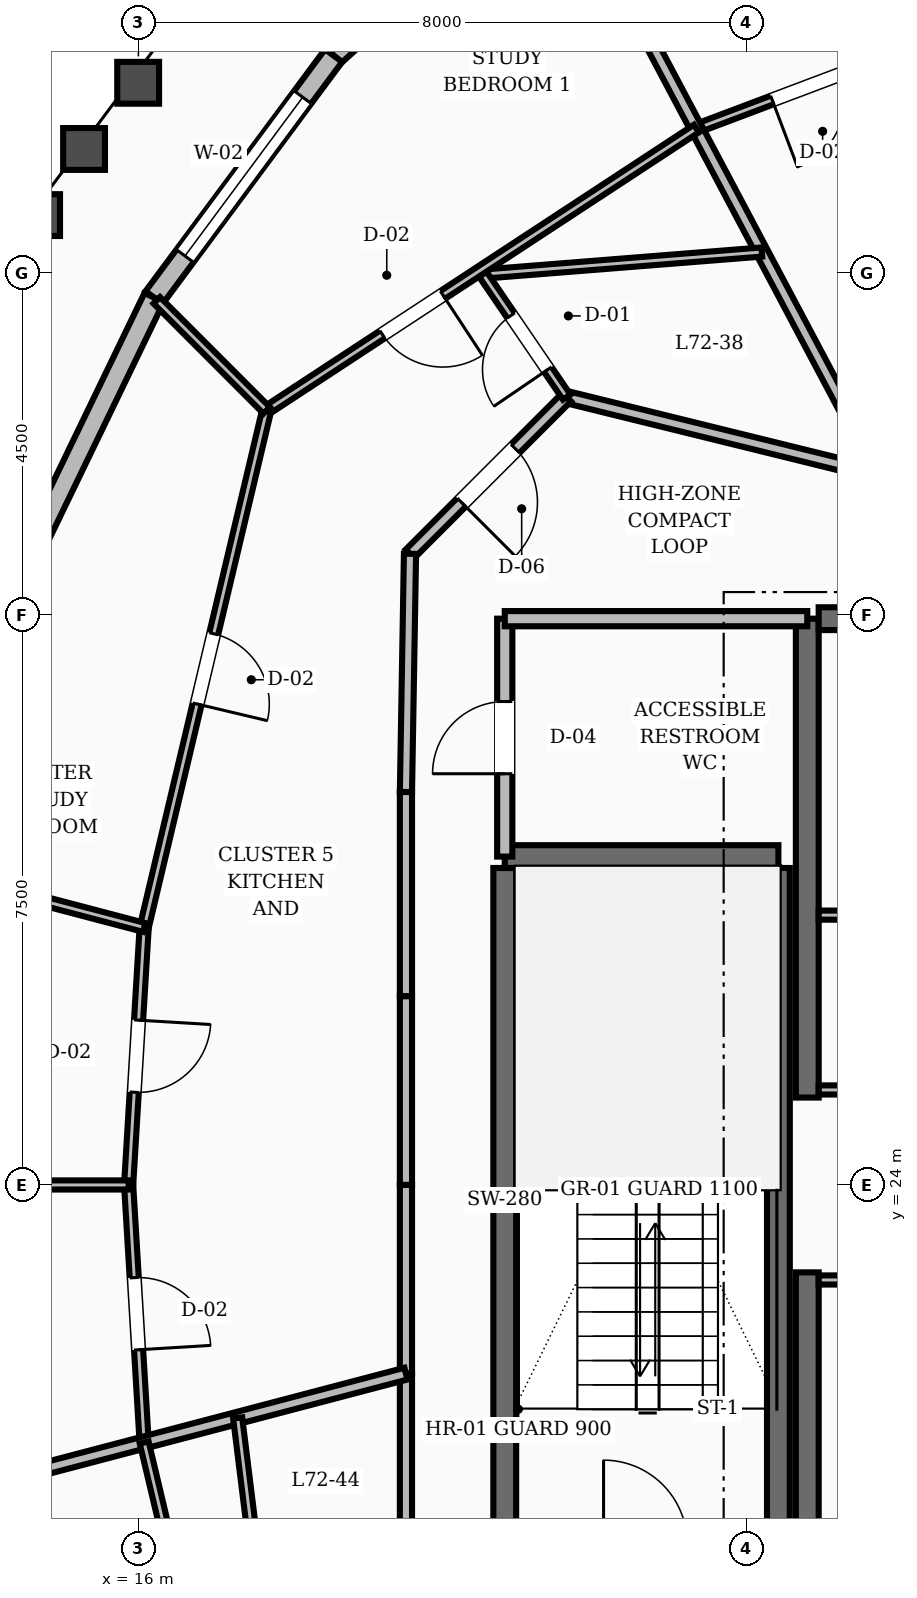
"""IFC4 building model, lengths in metres.
Left out: names, types, materials, properties, quantities, classifications, styles, units other than length and angle.
Written with IfcOpenShell. Run it as: python <this file> out.ifc"""

import sys

from ifc_helpers import new_model, si_unit, direction, frame, frame_2d, origin, place, context, subcontext, project, spatial, rectangle, extrude, element, fill, save


model = new_model("IFC4")
c1 = context("Model", 3, precision=1e-05, world=origin(), true_north=direction((0.0, 1.0)))
c2 = subcontext(c1, "Body", "Model", "MODEL_VIEW")
j1 = project(units=[si_unit("LENGTHUNIT", "METRE"), si_unit("PLANEANGLEUNIT", "RADIAN")], contexts=[c1])
p1 = place(None, origin())
s1 = spatial("IfcSite", under=j1, at=p1, CompositionType="ELEMENT")
p2 = place(p1, origin())
s2 = spatial("IfcBuilding", under=s1, at=p2, CompositionType="ELEMENT")
p3 = place(p2, frame((0.0, 0.0, 276.0)))
s3 = spatial("IfcBuildingStorey", under=s2, at=p3, CompositionType="ELEMENT", Elevation=276.0)
for number, where, z_axis, x_axis in (
    (1, (24.8, 16.55, 0.0), (0.0, 0.0, 1.0), (0.0, 1.0, 0.0)),
    (2, (24.8, 25.15, 0.0), (0.0, 0.0, 1.0), (0.0, 1.0, 0.0)),
):
    element("IfcWall", number, at=place(p3, frame(where, z_axis=z_axis, x_axis=x_axis)), inside=s3, PredefinedType="SHEAR", context=c2, shape_type="SweptSolid", body=[
        extrude(rectangle(XDim=6.3, YDim=0.3, at=frame_2d((3.15, 0.0))), origin(), (0.0, 0.0, 1.0), 3.6),
    ])
p4 = place(p3, frame((24.95, 31.45, 0.0), z_axis=(0.0, 0.0, 1.0), x_axis=(1.0, 0.0, 0.0)))
e3 = element("IfcWall", 3, at=p4, inside=s3, PredefinedType="SHEAR", context=c2, shape_type="SweptSolid", body=[
    extrude(rectangle(XDim=3.25, YDim=0.3, at=frame_2d((1.625, 0.0))), origin(), (0.0, 0.0, 1.0), 3.6),
])
for number, where, z_axis, x_axis in (
    (4, (20.82, 19.43, 0.0), (0.0, 0.0, 1.0), (0.0, 1.0, 0.0)),
    (5, (24.42, 19.43, 0.0), (0.0, 0.0, 1.0), (0.0, 1.0, 0.0)),
):
    element("IfcWall", number, at=place(p3, frame(where, z_axis=z_axis, x_axis=x_axis)), inside=s3, PredefinedType="SHEAR", context=c2, shape_type="SweptSolid", body=[
        extrude(rectangle(XDim=8.74, YDim=0.3, at=frame_2d((4.37, 0.0))), origin(), (0.0, 0.0, 1.0), 3.6),
    ])
p5 = place(p3, frame((20.82, 28.32, 0.0), z_axis=(0.0, 0.0, 1.0), x_axis=(1.0, 0.0, 0.0)))
e6 = element("IfcWall", 6, at=p5, inside=s3, PredefinedType="SHEAR", context=c2, shape_type="SweptSolid", body=[
    extrude(rectangle(XDim=3.6, YDim=0.3, at=frame_2d((1.8, 0.0))), origin(), (0.0, 0.0, 1.0), 3.6),
])
p6 = place(p3, frame((21.447, 41.471, 0.0), z_axis=(0.0, 0.0, 1.0), x_axis=(-0.740383189604, -0.672185043386, 0.0)))
e7 = element("IfcWall", 7, at=p6, inside=s3, PredefinedType="STANDARD", context=c2, shape_type="SweptSolid", body=[
    extrude(rectangle(XDim=3.888, YDim=0.28, at=frame_2d((1.944, 0.0))), origin(), (0.0, 0.0, 1.0), 2.88),
])
p7 = place(p3, frame((18.569, 38.858, 0.0), z_axis=(0.0, 0.0, 1.0), x_axis=(-0.595834112452, -0.803107533546, 0.0)))
e8 = element("IfcWall", 8, at=p7, inside=s3, PredefinedType="STANDARD", context=c2, shape_type="SweptSolid", body=[
    extrude(rectangle(XDim=3.965, YDim=0.28, at=frame_2d((1.982, 0.0))), origin(), (0.0, 0.0, 1.0), 2.88),
])
p8 = place(p7, frame((0.682, 0.0, 0.8)))
e9 = element("IfcOpeningElement", 9, at=p8, cuts=e8, PredefinedType="OPENING", context=c2, shape_type="SweptSolid", body=[
    extrude(rectangle(XDim=2.6, YDim=1.65, at=frame_2d((1.3, 0.825))), frame((0.0, 0.15, 0.0), z_axis=(0.0, -1.0, 0.0), x_axis=(1.0, 0.0, 0.0)), (0.0, 0.0, 1.0), 0.3),
])
p9 = place(p3, frame((16.206, 35.674, 0.0), z_axis=(0.0, 0.0, 1.0), x_axis=(-0.435070554904, -0.900396363973, 0.0)))
e10 = element("IfcWall", 10, at=p9, inside=s3, PredefinedType="STANDARD", context=c2, shape_type="SweptSolid", body=[
    extrude(rectangle(XDim=4.035, YDim=0.28, at=frame_2d((2.017, 0.0))), origin(), (0.0, 0.0, 1.0), 2.88),
])
p10 = place(p3, frame((20.82, 28.32, 0.0), z_axis=(0.0, 0.0, 1.0), x_axis=(0.0, 1.0, 0.0)))
e11 = element("IfcWall", 11, at=p10, inside=s3, PredefinedType="SOLIDWALL", context=c2, shape_type="SweptSolid", body=[
    extrude(rectangle(XDim=3.13, YDim=0.2, at=frame_2d((1.565, 0.0))), origin(), (0.0, 0.0, 1.0), 2.87),
])
p11 = place(p10, frame((1.09, 0.0, 0.0)))
e12 = element("IfcOpeningElement", 12, at=p11, cuts=e11, PredefinedType="OPENING", context=c2, shape_type="SweptSolid", body=[
    extrude(rectangle(XDim=0.95, YDim=2.1, at=frame_2d((0.475, 1.05))), frame((0.0, 0.11, 0.0), z_axis=(0.0, -1.0, 0.0), x_axis=(1.0, 0.0, 0.0)), (0.0, 0.0, 1.0), 0.22),
])
p12 = place(p3, frame((20.82, 31.45, 0.0), z_axis=(0.0, 0.0, 1.0), x_axis=(1.0, 0.0, 0.0)))
e13 = element("IfcWall", 13, at=p12, inside=s3, PredefinedType="SOLIDWALL", context=c2, shape_type="SweptSolid", body=[
    extrude(rectangle(XDim=3.98, YDim=0.2, at=frame_2d((1.99, 0.0))), origin(), (0.0, 0.0, 1.0), 2.87),
])
p13 = place(p3, frame((24.95, 25.25, 0.0), z_axis=(0.0, 0.0, 1.0), x_axis=(1.0, 0.0, 0.0)))
e14 = element("IfcWall", 14, at=p13, inside=s3, PredefinedType="PARTITIONING", context=c2, shape_type="SweptSolid", body=[
    extrude(rectangle(XDim=3.2, YDim=0.12, at=frame_2d((1.6, 0.0))), origin(), (0.0, 0.0, 1.0), 2.87),
])
p14 = place(p13, frame((1.125, 0.0, 0.0)))
e15 = element("IfcOpeningElement", 15, at=p14, cuts=e14, PredefinedType="OPENING", context=c2, shape_type="SweptSolid", body=[
    extrude(rectangle(XDim=0.95, YDim=2.1, at=frame_2d((0.475, 1.05))), frame((0.0, 0.07, 0.0), z_axis=(0.0, -1.0, 0.0), x_axis=(1.0, 0.0, 0.0)), (0.0, 0.0, 1.0), 0.14),
])
p15 = place(p3, frame((24.95, 22.75, 0.0), z_axis=(0.0, 0.0, 1.0), x_axis=(1.0, 0.0, 0.0)))
e16 = element("IfcWall", 16, at=p15, inside=s3, PredefinedType="PARTITIONING", context=c2, shape_type="SweptSolid", body=[
    extrude(rectangle(XDim=3.2, YDim=0.12, at=frame_2d((1.6, 0.0))), origin(), (0.0, 0.0, 1.0), 2.87),
])
p16 = place(p15, frame((1.125, 0.0, 0.0)))
e17 = element("IfcOpeningElement", 17, at=p16, cuts=e16, PredefinedType="OPENING", context=c2, shape_type="SweptSolid", body=[
    extrude(rectangle(XDim=0.95, YDim=2.1, at=frame_2d((0.475, 1.05))), frame((0.0, 0.07, 0.0), z_axis=(0.0, -1.0, 0.0), x_axis=(1.0, 0.0, 0.0)), (0.0, 0.0, 1.0), 0.14),
])
p17 = place(p3, frame((24.95, 27.55, 0.0), z_axis=(0.0, 0.0, 1.0), x_axis=(1.0, 0.0, 0.0)))
e18 = element("IfcWall", 18, at=p17, inside=s3, PredefinedType="PARTITIONING", context=c2, shape_type="SweptSolid", body=[
    extrude(rectangle(XDim=3.2, YDim=0.12, at=frame_2d((1.6, 0.0))), origin(), (0.0, 0.0, 1.0), 2.87),
])
p18 = place(p17, frame((1.125, 0.0, 0.0)))
e19 = element("IfcOpeningElement", 19, at=p18, cuts=e18, PredefinedType="OPENING", context=c2, shape_type="SweptSolid", body=[
    extrude(rectangle(XDim=0.95, YDim=2.1, at=frame_2d((0.475, 1.05))), frame((0.0, 0.07, 0.0), z_axis=(0.0, -1.0, 0.0), x_axis=(1.0, 0.0, 0.0)), (0.0, 0.0, 1.0), 0.14),
])
p19 = place(p3, frame((25.752, 33.35, 0.0), z_axis=(0.0, 0.0, 1.0), x_axis=(-0.970939799552, 0.239323850978, 0.0)))
e20 = element("IfcWall", 20, at=p19, inside=s3, PredefinedType="SOLIDWALL", context=c2, shape_type="SweptSolid", body=[
    extrude(rectangle(XDim=4.241, YDim=0.16, at=frame_2d((2.12, 0.0))), origin(), (0.0, 0.0, 1.0), 2.87),
])
p20 = place(p3, frame((21.635, 34.365, 0.0), z_axis=(0.0, 0.0, 1.0), x_axis=(-0.707106781187, -0.707106781187, 0.0)))
e21 = element("IfcWall", 21, at=p20, inside=s3, PredefinedType="SOLIDWALL", context=c2, shape_type="SweptSolid", body=[
    extrude(rectangle(XDim=2.916, YDim=0.16, at=frame_2d((1.458, 0.0))), origin(), (0.0, 0.0, 1.0), 2.87),
])
p21 = place(p20, frame((0.958, 0.0, 0.0)))
e22 = element("IfcOpeningElement", 22, at=p21, cuts=e21, PredefinedType="OPENING", context=c2, shape_type="SweptSolid", body=[
    extrude(rectangle(XDim=1.0, YDim=2.1, at=frame_2d((0.5, 1.05))), frame((0.0, 0.09, 0.0), z_axis=(0.0, -1.0, 0.0), x_axis=(1.0, 0.0, 0.0)), (0.0, 0.0, 1.0), 0.18),
])
p22 = place(p3, frame((19.573, 32.303, 0.0), z_axis=(0.0, 0.0, 1.0), x_axis=(-0.016981035134, -0.999855811828, 0.0)))
e23 = element("IfcWall", 23, at=p22, inside=s3, PredefinedType="SOLIDWALL", context=c2, shape_type="SweptSolid", body=[
    extrude(rectangle(XDim=3.134, YDim=0.16, at=frame_2d((1.567, 0.0))), origin(), (0.0, 0.0, 1.0), 2.87),
])
p23 = place(p3, frame((19.52, 29.169, 0.0), z_axis=(0.0, 0.0, 1.0), x_axis=(0.0, -1.0, 0.0)))
e24 = element("IfcWall", 24, at=p23, inside=s3, PredefinedType="SOLIDWALL", context=c2, shape_type="SweptSolid", body=[
    extrude(rectangle(XDim=2.687, YDim=0.16, at=frame_2d((1.344, 0.0))), origin(), (0.0, 0.0, 1.0), 2.87),
])
for number, where, z_axis, x_axis in (
    (25, (19.52, 26.482, 0.0), (0.0, 0.0, 1.0), (0.0, -1.0, 0.0)),
    (26, (19.52, 24.0, 0.0), (0.0, 0.0, 1.0), (0.0, -1.0, 0.0)),
):
    element("IfcWall", number, at=place(p3, frame(where, z_axis=z_axis, x_axis=x_axis)), inside=s3, PredefinedType="SOLIDWALL", context=c2, shape_type="SweptSolid", body=[
        extrude(rectangle(XDim=2.482, YDim=0.16, at=frame_2d((1.241, 0.0))), origin(), (0.0, 0.0, 1.0), 2.87),
    ])
p24 = place(p3, frame((19.52, 21.518, 0.0), z_axis=(0.0, 0.0, 1.0), x_axis=(0.0, -1.0, 0.0)))
e27 = element("IfcWall", 27, at=p24, inside=s3, PredefinedType="SOLIDWALL", context=c2, shape_type="SweptSolid", body=[
    extrude(rectangle(XDim=2.687, YDim=0.16, at=frame_2d((1.344, 0.0))), origin(), (0.0, 0.0, 1.0), 2.87),
])
p25 = place(p3, frame((26.225, 38.985, 0.0), z_axis=(0.0, 0.0, 1.0), x_axis=(-0.935699429687, -0.352798210431, 0.0)))
e28 = element("IfcWall", 28, at=p25, inside=s3, PredefinedType="PARTITIONING", context=c2, shape_type="SweptSolid", body=[
    extrude(rectangle(XDim=3.082, YDim=0.12, at=frame_2d((1.541, 0.0))), origin(), (0.0, 0.0, 1.0), 2.87),
])
p26 = place(p25, frame((1.066, 0.0, 0.0)))
e29 = element("IfcOpeningElement", 29, at=p26, cuts=e28, PredefinedType="OPENING", context=c2, shape_type="SweptSolid", body=[
    extrude(rectangle(XDim=0.95, YDim=2.1, at=frame_2d((0.475, 1.05))), frame((0.0, 0.07, 0.0), z_axis=(0.0, -1.0, 0.0), x_axis=(1.0, 0.0, 0.0)), (0.0, 0.0, 1.0), 0.14),
])
p27 = place(p3, frame((25.752, 33.35, 0.0), z_axis=(0.0, 0.0, 1.0), x_axis=(-0.468387037798, 0.883523391214, 0.0)))
e30 = element("IfcWall", 30, at=p27, inside=s3, PredefinedType="SOLIDWALL", context=c2, shape_type="SweptSolid", body=[
    extrude(rectangle(XDim=9.142, YDim=0.16, at=frame_2d((4.571, 0.0))), origin(), (0.0, 0.0, 1.0), 2.87),
])
p28 = place(p3, frame((24.202, 36.274, 0.0), z_axis=(0.0, 0.0, 1.0), x_axis=(-0.996873188539, -0.079018010423, 0.0)))
e31 = element("IfcWall", 31, at=p28, inside=s3, PredefinedType="PARTITIONING", context=c2, shape_type="SweptSolid", body=[
    extrude(rectangle(XDim=3.683, YDim=0.12, at=frame_2d((1.841, 0.0))), origin(), (0.0, 0.0, 1.0), 2.87),
])
p29 = place(p3, frame((21.635, 34.365, 0.0), z_axis=(0.0, 0.0, 1.0), x_axis=(-0.563700368574, 0.825979354748, 0.0)))
e32 = element("IfcWall", 32, at=p29, inside=s3, PredefinedType="PARTITIONING", context=c2, shape_type="SweptSolid", body=[
    extrude(rectangle(XDim=1.958, YDim=0.12, at=frame_2d((0.979, 0.0))), origin(), (0.0, 0.0, 1.0), 2.87),
])
p30 = place(p29, frame((0.44, 0.0, 0.0)))
e33 = element("IfcOpeningElement", 33, at=p30, cuts=e32, PredefinedType="OPENING", context=c2, shape_type="SweptSolid", body=[
    extrude(rectangle(XDim=0.86, YDim=2.1, at=frame_2d((0.43, 1.05))), frame((0.0, 0.07, 0.0), z_axis=(0.0, -1.0, 0.0), x_axis=(1.0, 0.0, 0.0)), (0.0, 0.0, 1.0), 0.14),
])
p31 = place(p3, frame((23.341, 37.898, 0.0), z_axis=(0.0, 0.0, 1.0), x_axis=(-0.836259569514, -0.548333778274, 0.0)))
e34 = element("IfcWall", 34, at=p31, inside=s3, PredefinedType="PARTITIONING", context=c2, shape_type="SweptSolid", body=[
    extrude(rectangle(XDim=6.76, YDim=0.12, at=frame_2d((3.38, 0.0))), origin(), (0.0, 0.0, 1.0), 2.87),
])
p32 = place(p31, frame((3.99, 0.0, 0.0)))
e35 = element("IfcOpeningElement", 35, at=p32, cuts=e34, PredefinedType="OPENING", context=c2, shape_type="SweptSolid", body=[
    extrude(rectangle(XDim=0.95, YDim=2.1, at=frame_2d((0.475, 1.05))), frame((0.0, 0.07, 0.0), z_axis=(0.0, -1.0, 0.0), x_axis=(1.0, 0.0, 0.0)), (0.0, 0.0, 1.0), 0.14),
])
p33 = place(p3, frame((17.688, 34.191, 0.0), z_axis=(0.0, 0.0, 1.0), x_axis=(-0.230512502036, -0.973069363615, 0.0)))
e36 = element("IfcWall", 36, at=p33, inside=s3, PredefinedType="PARTITIONING", context=c2, shape_type="SweptSolid", body=[
    extrude(rectangle(XDim=6.991, YDim=0.12, at=frame_2d((3.496, 0.0))), origin(), (0.0, 0.0, 1.0), 2.87),
])
p34 = place(p33, frame((3.021, 0.0, 0.0)))
e37 = element("IfcOpeningElement", 37, at=p34, cuts=e36, PredefinedType="OPENING", context=c2, shape_type="SweptSolid", body=[
    extrude(rectangle(XDim=0.95, YDim=2.1, at=frame_2d((0.475, 1.05))), frame((0.0, 0.07, 0.0), z_axis=(0.0, -1.0, 0.0), x_axis=(1.0, 0.0, 0.0)), (0.0, 0.0, 1.0), 0.14),
])
p35 = place(p3, frame((17.688, 34.191, 0.0), z_axis=(0.0, 0.0, 1.0), x_axis=(-0.706689063462, 0.707524252293, 0.0)))
e38 = element("IfcWall", 38, at=p35, inside=s3, PredefinedType="PARTITIONING", context=c2, shape_type="SweptSolid", body=[
    extrude(rectangle(XDim=2.046, YDim=0.12, at=frame_2d((1.023, 0.0))), origin(), (0.0, 0.0, 1.0), 2.87),
])
p36 = place(p3, frame((16.076, 27.388, 0.0), z_axis=(0.0, 0.0, 1.0), x_axis=(-0.060277885003, -0.998181635064, 0.0)))
e39 = element("IfcWall", 39, at=p36, inside=s3, PredefinedType="PARTITIONING", context=c2, shape_type="SweptSolid", body=[
    extrude(rectangle(XDim=3.394, YDim=0.12, at=frame_2d((1.697, 0.0))), origin(), (0.0, 0.0, 1.0), 2.87),
])
p37 = place(p36, frame((1.222, 0.0, 0.0)))
e40 = element("IfcOpeningElement", 40, at=p37, cuts=e39, PredefinedType="OPENING", context=c2, shape_type="SweptSolid", body=[
    extrude(rectangle(XDim=0.95, YDim=2.1, at=frame_2d((0.475, 1.05))), frame((0.0, 0.07, 0.0), z_axis=(0.0, -1.0, 0.0), x_axis=(1.0, 0.0, 0.0)), (0.0, 0.0, 1.0), 0.14),
])
p38 = place(p3, frame((16.076, 27.388, 0.0), z_axis=(0.0, 0.0, 1.0), x_axis=(-0.96713435231, 0.25426589347, 0.0)))
e41 = element("IfcWall", 41, at=p38, inside=s3, PredefinedType="PARTITIONING", context=c2, shape_type="SweptSolid", body=[
    extrude(rectangle(XDim=2.748, YDim=0.12, at=frame_2d((1.374, 0.0))), origin(), (0.0, 0.0, 1.0), 2.87),
])
p39 = place(p3, frame((15.872, 24.0, 0.0), z_axis=(0.0, 0.0, 1.0), x_axis=(0.060277885003, -0.998181635064, 0.0)))
e42 = element("IfcWall", 42, at=p39, inside=s3, PredefinedType="PARTITIONING", context=c2, shape_type="SweptSolid", body=[
    extrude(rectangle(XDim=3.394, YDim=0.12, at=frame_2d((1.697, 0.0))), origin(), (0.0, 0.0, 1.0), 2.87),
])
p40 = place(p39, frame((1.222, 0.0, 0.0)))
e43 = element("IfcOpeningElement", 43, at=p40, cuts=e42, PredefinedType="OPENING", context=c2, shape_type="SweptSolid", body=[
    extrude(rectangle(XDim=0.95, YDim=2.1, at=frame_2d((0.475, 1.05))), frame((0.0, 0.07, 0.0), z_axis=(0.0, -1.0, 0.0), x_axis=(1.0, 0.0, 0.0)), (0.0, 0.0, 1.0), 0.14),
])
p41 = place(p3, frame((15.872, 24.0, 0.0), z_axis=(0.0, 0.0, 1.0), x_axis=(-1.0, 0.0, 0.0)))
e44 = element("IfcWall", 44, at=p41, inside=s3, PredefinedType="PARTITIONING", context=c2, shape_type="SweptSolid", body=[
    extrude(rectangle(XDim=2.816, YDim=0.12, at=frame_2d((1.408, 0.0))), origin(), (0.0, 0.0, 1.0), 2.87),
])
p42 = place(p3, frame((19.52, 21.518, 0.0), z_axis=(0.0, 0.0, 1.0), x_axis=(-0.967130154466, -0.254281859995, 0.0)))
e45 = element("IfcWall", 45, at=p42, inside=s3, PredefinedType="SOLIDWALL", context=c2, shape_type="SweptSolid", body=[
    extrude(rectangle(XDim=6.309, YDim=0.16, at=frame_2d((3.154, 0.0))), origin(), (0.0, 0.0, 1.0), 2.87),
])
p43 = place(p3, frame((17.306, 20.936, 0.0), z_axis=(0.0, 0.0, 1.0), x_axis=(0.12312261881, -0.99239146547, 0.0)))
e46 = element("IfcWall", 46, at=p43, inside=s3, PredefinedType="PARTITIONING", context=c2, shape_type="SweptSolid", body=[
    extrude(rectangle(XDim=3.163, YDim=0.12, at=frame_2d((1.582, 0.0))), origin(), (0.0, 0.0, 1.0), 2.87),
])
p44 = place(p3, frame((16.076, 20.612, 0.0), z_axis=(0.0, 0.0, 1.0), x_axis=(0.230512502036, -0.973069363615, 0.0)))
e47 = element("IfcWall", 47, at=p44, inside=s3, PredefinedType="PARTITIONING", context=c2, shape_type="SweptSolid", body=[
    extrude(rectangle(XDim=6.991, YDim=0.12, at=frame_2d((3.496, 0.0))), origin(), (0.0, 0.0, 1.0), 2.87),
])
p45 = place(p44, frame((4.156, 0.0, 0.0)))
e48 = element("IfcOpeningElement", 48, at=p45, cuts=e47, PredefinedType="OPENING", context=c2, shape_type="SweptSolid", body=[
    extrude(rectangle(XDim=0.95, YDim=2.1, at=frame_2d((0.475, 1.05))), frame((0.0, 0.07, 0.0), z_axis=(0.0, -1.0, 0.0), x_axis=(1.0, 0.0, 0.0)), (0.0, 0.0, 1.0), 0.14),
])
p46 = place(p8, origin())
e49 = element("IfcWindow", 49, at=p46, inside=s3, PartitioningType="SINGLE_PANEL", PredefinedType="WINDOW", context=c2, shape_type="SweptSolid", body=[
    extrude(rectangle(XDim=2.6, YDim=1.65, at=frame_2d((1.3, 0.825))), frame((0.0, 0.03, 0.0), z_axis=(0.0, -1.0, 0.0), x_axis=(1.0, 0.0, 0.0)), (0.0, 0.0, 1.0), 0.06),
])
fill(e9, e49)
p47 = place(p11, origin())
e50 = element("IfcDoor", 50, at=p47, inside=s3, OperationType="SINGLE_SWING_LEFT", PredefinedType="DOOR", context=c2, shape_type="SweptSolid", body=[
    extrude(rectangle(XDim=0.95, YDim=2.1, at=frame_2d((0.475, 1.05))), frame((0.0, 0.025, 0.0), z_axis=(0.0, -1.0, 0.0), x_axis=(1.0, 0.0, 0.0)), (0.0, 0.0, 1.0), 0.05),
])
fill(e12, e50)
p48 = place(p26, origin())
e51 = element("IfcDoor", 51, at=p48, inside=s3, OperationType="SINGLE_SWING_RIGHT", PredefinedType="DOOR", context=c2, shape_type="SweptSolid", body=[
    extrude(rectangle(XDim=0.95, YDim=2.1, at=frame_2d((0.475, 1.05))), frame((0.0, 0.025, 0.0), z_axis=(0.0, -1.0, 0.0), x_axis=(1.0, 0.0, 0.0)), (0.0, 0.0, 1.0), 0.05),
])
fill(e29, e51)
p49 = place(p30, origin())
e52 = element("IfcDoor", 52, at=p49, inside=s3, OperationType="SINGLE_SWING_LEFT", PredefinedType="DOOR", context=c2, shape_type="SweptSolid", body=[
    extrude(rectangle(XDim=0.86, YDim=2.1, at=frame_2d((0.43, 1.05))), frame((0.0, 0.025, 0.0), z_axis=(0.0, -1.0, 0.0), x_axis=(1.0, 0.0, 0.0)), (0.0, 0.0, 1.0), 0.05),
])
fill(e33, e52)
p50 = place(p21, origin())
e53 = element("IfcDoor", 53, at=p50, inside=s3, OperationType="SINGLE_SWING_RIGHT", PredefinedType="DOOR", context=c2, shape_type="SweptSolid", body=[
    extrude(rectangle(XDim=1.0, YDim=2.1, at=frame_2d((0.5, 1.05))), frame((0.0, 0.025, 0.0), z_axis=(0.0, -1.0, 0.0), x_axis=(1.0, 0.0, 0.0)), (0.0, 0.0, 1.0), 0.05),
])
fill(e22, e53)
p51 = place(p32, origin())
e54 = element("IfcDoor", 54, at=p51, inside=s3, OperationType="SINGLE_SWING_LEFT", PredefinedType="DOOR", context=c2, shape_type="SweptSolid", body=[
    extrude(rectangle(XDim=0.95, YDim=2.1, at=frame_2d((0.475, 1.05))), frame((0.0, 0.025, 0.0), z_axis=(0.0, -1.0, 0.0), x_axis=(1.0, 0.0, 0.0)), (0.0, 0.0, 1.0), 0.05),
])
fill(e35, e54)
p52 = place(p34, origin())
e55 = element("IfcDoor", 55, at=p52, inside=s3, OperationType="SINGLE_SWING_RIGHT", PredefinedType="DOOR", context=c2, shape_type="SweptSolid", body=[
    extrude(rectangle(XDim=0.95, YDim=2.1, at=frame_2d((0.475, 1.05))), frame((0.0, 0.025, 0.0), z_axis=(0.0, -1.0, 0.0), x_axis=(1.0, 0.0, 0.0)), (0.0, 0.0, 1.0), 0.05),
])
fill(e37, e55)
p53 = place(p37, origin())
e56 = element("IfcDoor", 56, at=p53, inside=s3, OperationType="SINGLE_SWING_LEFT", PredefinedType="DOOR", context=c2, shape_type="SweptSolid", body=[
    extrude(rectangle(XDim=0.95, YDim=2.1, at=frame_2d((0.475, 1.05))), frame((0.0, 0.025, 0.0), z_axis=(0.0, -1.0, 0.0), x_axis=(1.0, 0.0, 0.0)), (0.0, 0.0, 1.0), 0.05),
])
fill(e40, e56)
p54 = place(p40, origin())
e57 = element("IfcDoor", 57, at=p54, inside=s3, OperationType="SINGLE_SWING_RIGHT", PredefinedType="DOOR", context=c2, shape_type="SweptSolid", body=[
    extrude(rectangle(XDim=0.95, YDim=2.1, at=frame_2d((0.475, 1.05))), frame((0.0, 0.025, 0.0), z_axis=(0.0, -1.0, 0.0), x_axis=(1.0, 0.0, 0.0)), (0.0, 0.0, 1.0), 0.05),
])
fill(e43, e57)
save(model, sys.argv[1])
